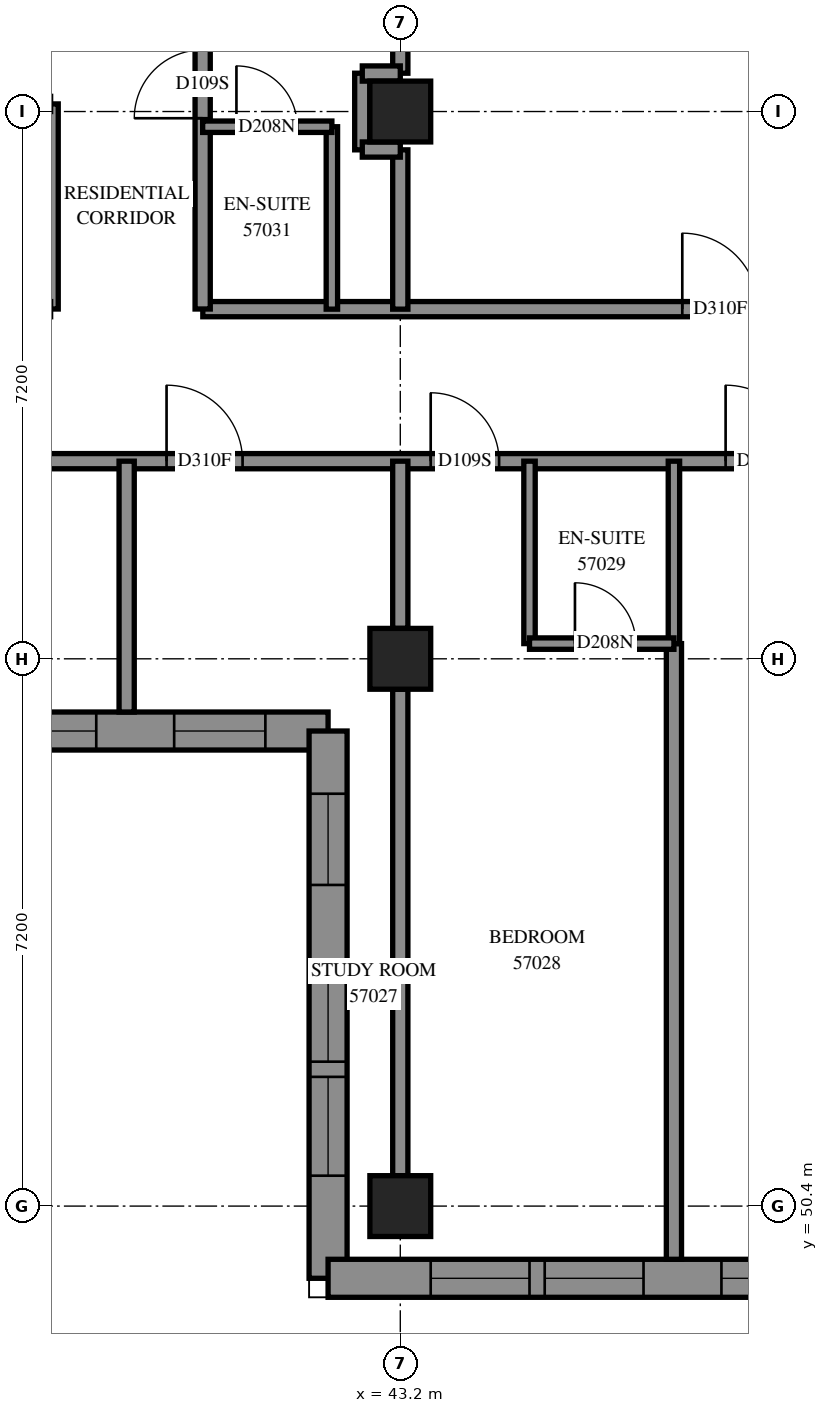
"""IFC4 building model, lengths in metres.
Left out: names, types, materials, properties, quantities, classifications, styles, units other than length and angle.
Written with IfcOpenShell. Run it as: python <this file> out.ifc"""

import sys

from ifc_helpers import new_model, si_unit, direction, frame, frame_2d, origin, origin_2d, place, context, subcontext, project, spatial, polyline, rectangle, outline, extrude, element, fill, save


model = new_model("IFC4")
c1 = context("Model", 3, precision=1e-05, world=origin(), true_north=direction((0.0, 1.0)))
c2 = subcontext(c1, "Body", "Model", "MODEL_VIEW")
j1 = project(units=[si_unit("LENGTHUNIT", "METRE"), si_unit("PLANEANGLEUNIT", "RADIAN")], contexts=[c1])
p1 = place(None, origin())
s1 = spatial("IfcSite", under=j1, at=p1, CompositionType="ELEMENT")
p2 = place(p1, origin())
s2 = spatial("IfcBuilding", under=s1, at=p2, CompositionType="ELEMENT")
p3 = place(p2, frame((0.0, 0.0, 210.0)))
s3 = spatial("IfcBuildingStorey", under=s2, at=p3, CompositionType="ELEMENT", Elevation=210.0)
for number, where, z_axis, x_axis in (
    (1, (43.2, 50.4, 0.0), (0.0, 0.0, 1.0), (1.0, 0.0, 0.0)),
    (2, (43.2, 57.6, 0.0), (0.0, 0.0, 1.0), (1.0, 0.0, 0.0)),
    (3, (43.2, 64.8, 0.0), (0.0, 0.0, 1.0), (1.0, 0.0, 0.0)),
):
    element("IfcColumn", number, at=place(p3, frame(where, z_axis=z_axis, x_axis=x_axis)), inside=s3, PredefinedType="COLUMN", context=c2, shape_type="SweptSolid", body=[
        extrude(rectangle(XDim=0.8, YDim=0.8, at=origin_2d()), origin(), (0.0, 0.0, 1.0), 3.1),
    ])
p4 = place(p3, frame((35.05, 56.65, 0.0), z_axis=(0.0, 0.0, 1.0), x_axis=(1.0, 0.0, 0.0)))
e4 = element("IfcWall", 4, at=p4, inside=s3, PredefinedType="SOLIDWALL", context=c2, shape_type="SweptSolid", body=[
    extrude(outline(polyline([(-0.25, -0.25), (6.95, -0.25), (7.45, 0.25), (0.25, 0.25), (-0.25, -0.25)])), origin(), (0.0, 0.0, 1.0), 3.1),
])
p5 = place(p4, frame((1.35, 0.0, 0.45)))
e5 = element("IfcOpeningElement", 5, at=p5, cuts=e4, PredefinedType="OPENING", context=c2, shape_type="SweptSolid", body=[
    extrude(rectangle(XDim=1.3, YDim=2.5, at=frame_2d((0.65, 1.25))), frame((0.0, 0.26, 0.0), z_axis=(0.0, -1.0, 0.0), x_axis=(1.0, 0.0, 0.0)), (0.0, 0.0, 1.0), 0.52),
])
p6 = place(p4, frame((2.85, 0.0, 0.45)))
e6 = element("IfcOpeningElement", 6, at=p6, cuts=e4, PredefinedType="OPENING", context=c2, shape_type="SweptSolid", body=[
    extrude(rectangle(XDim=1.3, YDim=2.5, at=frame_2d((0.65, 1.25))), frame((0.0, 0.26, 0.0), z_axis=(0.0, -1.0, 0.0), x_axis=(1.0, 0.0, 0.0)), (0.0, 0.0, 1.0), 0.52),
])
p7 = place(p4, frame((5.175, 0.0, 0.45)))
e7 = element("IfcOpeningElement", 7, at=p7, cuts=e4, PredefinedType="OPENING", context=c2, shape_type="SweptSolid", body=[
    extrude(rectangle(XDim=1.2, YDim=2.5, at=frame_2d((0.6, 1.25))), frame((0.0, 0.26, 0.0), z_axis=(0.0, -1.0, 0.0), x_axis=(1.0, 0.0, 0.0)), (0.0, 0.0, 1.0), 0.52),
])
p8 = place(p3, frame((42.25, 56.65, 0.0), z_axis=(0.0, 0.0, 1.0), x_axis=(0.0, -1.0, 0.0)))
e8 = element("IfcWall", 8, at=p8, inside=s3, PredefinedType="SOLIDWALL", context=c2, shape_type="SweptSolid", body=[
    extrude(outline(polyline([(0.25, -0.25), (7.45, -0.25), (6.95, 0.25), (-0.25, 0.25), (0.25, -0.25)])), origin(), (0.0, 0.0, 1.0), 3.1),
])
p9 = place(p8, frame((3.05, 0.0, 0.45)))
e9 = element("IfcOpeningElement", 9, at=p9, cuts=e8, PredefinedType="OPENING", context=c2, shape_type="SweptSolid", body=[
    extrude(rectangle(XDim=1.3, YDim=2.5, at=frame_2d((0.65, 1.25))), frame((0.0, 0.26, 0.0), z_axis=(0.0, -1.0, 0.0), x_axis=(1.0, 0.0, 0.0)), (0.0, 0.0, 1.0), 0.52),
])
p10 = place(p8, frame((4.55, 0.0, 0.45)))
e10 = element("IfcOpeningElement", 10, at=p10, cuts=e8, PredefinedType="OPENING", context=c2, shape_type="SweptSolid", body=[
    extrude(rectangle(XDim=1.3, YDim=2.5, at=frame_2d((0.65, 1.25))), frame((0.0, 0.26, 0.0), z_axis=(0.0, -1.0, 0.0), x_axis=(1.0, 0.0, 0.0)), (0.0, 0.0, 1.0), 0.52),
])
p11 = place(p8, frame((0.825, 0.0, 0.45)))
e11 = element("IfcOpeningElement", 11, at=p11, cuts=e8, PredefinedType="OPENING", context=c2, shape_type="SweptSolid", body=[
    extrude(rectangle(XDim=1.2, YDim=2.5, at=frame_2d((0.6, 1.25))), frame((0.0, 0.26, 0.0), z_axis=(0.0, -1.0, 0.0), x_axis=(1.0, 0.0, 0.0)), (0.0, 0.0, 1.0), 0.52),
])
p12 = place(p3, frame((42.25, 49.45, 0.0), z_axis=(0.0, 0.0, 1.0), x_axis=(1.0, 0.0, 0.0)))
e12 = element("IfcWall", 12, at=p12, inside=s3, PredefinedType="SOLIDWALL", context=c2, shape_type="SweptSolid", body=[
    extrude(outline(polyline([(-0.25, -0.25), (6.95, -0.25), (7.45, 0.25), (0.25, 0.25), (-0.25, -0.25)])), origin(), (0.0, 0.0, 1.0), 3.1),
])
p13 = place(p12, frame((1.35, 0.0, 0.45)))
e13 = element("IfcOpeningElement", 13, at=p13, cuts=e12, PredefinedType="OPENING", context=c2, shape_type="SweptSolid", body=[
    extrude(rectangle(XDim=1.3, YDim=2.5, at=frame_2d((0.65, 1.25))), frame((0.0, 0.26, 0.0), z_axis=(0.0, -1.0, 0.0), x_axis=(1.0, 0.0, 0.0)), (0.0, 0.0, 1.0), 0.52),
])
p14 = place(p12, frame((2.85, 0.0, 0.45)))
e14 = element("IfcOpeningElement", 14, at=p14, cuts=e12, PredefinedType="OPENING", context=c2, shape_type="SweptSolid", body=[
    extrude(rectangle(XDim=1.3, YDim=2.5, at=frame_2d((0.65, 1.25))), frame((0.0, 0.26, 0.0), z_axis=(0.0, -1.0, 0.0), x_axis=(1.0, 0.0, 0.0)), (0.0, 0.0, 1.0), 0.52),
])
p15 = place(p12, frame((5.175, 0.0, 0.45)))
e15 = element("IfcOpeningElement", 15, at=p15, cuts=e12, PredefinedType="OPENING", context=c2, shape_type="SweptSolid", body=[
    extrude(rectangle(XDim=1.2, YDim=2.5, at=frame_2d((0.6, 1.25))), frame((0.0, 0.26, 0.0), z_axis=(0.0, -1.0, 0.0), x_axis=(1.0, 0.0, 0.0)), (0.0, 0.0, 1.0), 0.52),
])
p16 = place(p3, frame((36.0, 60.2, 0.0), z_axis=(0.0, 0.0, 1.0), x_axis=(1.0, 0.0, 0.0)))
e16 = element("IfcWall", 16, at=p16, inside=s3, PredefinedType="PARTITIONING", context=c2, shape_type="SweptSolid", body=[
    extrude(rectangle(XDim=17.0, YDim=0.2, at=frame_2d((8.5, 0.0))), origin(), (0.0, 0.0, 1.0), 3.1),
])
p17 = place(p16, frame((4.125, 0.0, 0.0)))
e17 = element("IfcOpeningElement", 17, at=p17, cuts=e16, PredefinedType="OPENING", context=c2, shape_type="SweptSolid", body=[
    extrude(rectangle(XDim=1.0, YDim=2.1, at=frame_2d((0.5, 1.05))), frame((0.0, 0.11, 0.0), z_axis=(0.0, -1.0, 0.0), x_axis=(1.0, 0.0, 0.0)), (0.0, 0.0, 1.0), 0.22),
])
p18 = place(p16, frame((7.6, 0.0, 0.0)))
e18 = element("IfcOpeningElement", 18, at=p18, cuts=e16, PredefinedType="OPENING", context=c2, shape_type="SweptSolid", body=[
    extrude(rectangle(XDim=0.9, YDim=2.1, at=frame_2d((0.45, 1.05))), frame((0.0, 0.11, 0.0), z_axis=(0.0, -1.0, 0.0), x_axis=(1.0, 0.0, 0.0)), (0.0, 0.0, 1.0), 0.22),
])
p19 = place(p16, frame((11.48, 0.0, 0.0)))
e19 = element("IfcOpeningElement", 19, at=p19, cuts=e16, PredefinedType="OPENING", context=c2, shape_type="SweptSolid", body=[
    extrude(rectangle(XDim=1.0, YDim=2.1, at=frame_2d((0.5, 1.05))), frame((0.0, 0.11, 0.0), z_axis=(0.0, -1.0, 0.0), x_axis=(1.0, 0.0, 0.0)), (0.0, 0.0, 1.0), 0.22),
])
p20 = place(p16, frame((15.805, 0.0, 0.0)))
e20 = element("IfcOpeningElement", 20, at=p20, cuts=e16, PredefinedType="OPENING", context=c2, shape_type="SweptSolid", body=[
    extrude(rectangle(XDim=1.0, YDim=2.1, at=frame_2d((0.5, 1.05))), frame((0.0, 0.11, 0.0), z_axis=(0.0, -1.0, 0.0), x_axis=(1.0, 0.0, 0.0)), (0.0, 0.0, 1.0), 0.22),
])
p21 = place(p3, frame((40.602, 62.2, 0.0), z_axis=(0.0, 0.0, 1.0), x_axis=(1.0, 0.0, 0.0)))
e21 = element("IfcWall", 21, at=p21, inside=s3, PredefinedType="PARTITIONING", context=c2, shape_type="SweptSolid", body=[
    extrude(rectangle(XDim=14.998, YDim=0.2, at=frame_2d((7.499, 0.0))), origin(), (0.0, 0.0, 1.0), 3.1),
])
p22 = place(p21, frame((6.308, 0.0, 0.0)))
e22 = element("IfcOpeningElement", 22, at=p22, cuts=e21, PredefinedType="OPENING", context=c2, shape_type="SweptSolid", body=[
    extrude(rectangle(XDim=1.0, YDim=2.1, at=frame_2d((0.5, 1.05))), frame((0.0, 0.11, 0.0), z_axis=(0.0, -1.0, 0.0), x_axis=(1.0, 0.0, 0.0)), (0.0, 0.0, 1.0), 0.22),
])
p23 = place(p21, frame((9.928, 0.0, 0.0)))
e23 = element("IfcOpeningElement", 23, at=p23, cuts=e21, PredefinedType="OPENING", context=c2, shape_type="SweptSolid", body=[
    extrude(rectangle(XDim=0.9, YDim=2.1, at=frame_2d((0.45, 1.05))), frame((0.0, 0.11, 0.0), z_axis=(0.0, -1.0, 0.0), x_axis=(1.0, 0.0, 0.0)), (0.0, 0.0, 1.0), 0.22),
])
p24 = place(p21, frame((13.746, 0.0, 0.0)))
e24 = element("IfcOpeningElement", 24, at=p24, cuts=e21, PredefinedType="OPENING", context=c2, shape_type="SweptSolid", body=[
    extrude(rectangle(XDim=1.0, YDim=2.1, at=frame_2d((0.5, 1.05))), frame((0.0, 0.11, 0.0), z_axis=(0.0, -1.0, 0.0), x_axis=(1.0, 0.0, 0.0)), (0.0, 0.0, 1.0), 0.22),
])
p25 = place(p3, frame((46.8, 49.7, 0.0), z_axis=(0.0, 0.0, 1.0), x_axis=(0.0, 1.0, 0.0)))
e25 = element("IfcWall", 25, at=p25, inside=s3, PredefinedType="PARTITIONING", context=c2, shape_type="SweptSolid", body=[
    extrude(rectangle(XDim=8.1, YDim=0.2, at=frame_2d((4.05, 0.0))), origin(), (0.0, 0.0, 1.0), 3.1),
])
p26 = place(p3, frame((43.2, 50.8, 0.0), z_axis=(0.0, 0.0, 1.0), x_axis=(0.0, 1.0, 0.0)))
e26 = element("IfcWall", 26, at=p26, inside=s3, PredefinedType="PARTITIONING", context=c2, shape_type="SweptSolid", body=[
    extrude(rectangle(XDim=6.4, YDim=0.2, at=frame_2d((3.2, 0.0))), origin(), (0.0, 0.0, 1.0), 2.6),
])
p27 = place(p3, frame((43.2, 65.304, 0.0), z_axis=(0.0, 0.0, 1.0), x_axis=(0.0, 1.0, 0.0)))
e27 = element("IfcWall", 27, at=p27, inside=s3, PredefinedType="PARTITIONING", context=c2, shape_type="SweptSolid", body=[
    extrude(rectangle(XDim=6.192, YDim=0.2, at=frame_2d((3.096, 0.0))), origin(), (0.0, 0.0, 1.0), 3.1),
])
p28 = place(p3, frame((40.6, 62.202, 0.0), z_axis=(0.0, 0.0, 1.0), x_axis=(0.0, 1.0, 0.0)))
e28 = element("IfcWall", 28, at=p28, inside=s3, PredefinedType="PARTITIONING", context=c2, shape_type="SweptSolid", body=[
    extrude(rectangle(XDim=4.698, YDim=0.2, at=frame_2d((2.349, 0.0))), origin(), (0.0, 0.0, 1.0), 3.1),
])
p29 = place(p28, frame((2.51, 0.0, 0.0)))
e29 = element("IfcOpeningElement", 29, at=p29, cuts=e28, PredefinedType="OPENING", context=c2, shape_type="SweptSolid", body=[
    extrude(rectangle(XDim=0.9, YDim=2.1, at=frame_2d((0.45, 1.05))), frame((0.0, 0.11, 0.0), z_axis=(0.0, -1.0, 0.0), x_axis=(1.0, 0.0, 0.0)), (0.0, 0.0, 1.0), 0.22),
])
p30 = place(p3, frame((39.6, 56.9, 0.0), z_axis=(0.0, 0.0, 1.0), x_axis=(0.0, 1.0, 0.0)))
e30 = element("IfcWall", 30, at=p30, inside=s3, PredefinedType="PARTITIONING", context=c2, shape_type="SweptSolid", body=[
    extrude(rectangle(XDim=3.3, YDim=0.2, at=frame_2d((1.65, 0.0))), origin(), (0.0, 0.0, 1.0), 3.1),
])
p31 = place(p3, frame((38.6, 62.202, 0.0), z_axis=(0.0, 0.0, 1.0), x_axis=(0.0, 1.0, 0.0)))
e31 = element("IfcWall", 31, at=p31, inside=s3, PredefinedType="PARTITIONING", context=c2, shape_type="SweptSolid", body=[
    extrude(rectangle(XDim=2.698, YDim=0.2, at=frame_2d((1.349, 0.0))), origin(), (0.0, 0.0, 1.0), 3.1),
])
for number, where, z_axis, x_axis in (
    (32, (44.9, 57.8, 0.0), (0.0, 0.0, 1.0), (0.0, 1.0, 0.0)),
    (33, (46.8, 57.8, 0.0), (0.0, 0.0, 1.0), (0.0, 1.0, 0.0)),
    (34, (42.3, 62.2, 0.0), (0.0, 0.0, 1.0), (0.0, 1.0, 0.0)),
):
    element("IfcWall", number, at=place(p3, frame(where, z_axis=z_axis, x_axis=x_axis)), inside=s3, PredefinedType="PARTITIONING", context=c2, shape_type="SweptSolid", body=[
        extrude(rectangle(XDim=2.4, YDim=0.15, at=frame_2d((1.2, 0.0))), origin(), (0.0, 0.0, 1.0), 3.1),
    ])
p32 = place(p3, frame((43.2, 58.0, 0.0), z_axis=(0.0, 0.0, 1.0), x_axis=(0.0, 1.0, 0.0)))
e35 = element("IfcWall", 35, at=p32, inside=s3, PredefinedType="PARTITIONING", context=c2, shape_type="SweptSolid", body=[
    extrude(rectangle(XDim=2.2, YDim=0.2, at=frame_2d((1.1, 0.0))), origin(), (0.0, 0.0, 1.0), 3.1),
])
p33 = place(p3, frame((43.2, 62.2, 0.0), z_axis=(0.0, 0.0, 1.0), x_axis=(0.0, 1.0, 0.0)))
e36 = element("IfcWall", 36, at=p33, inside=s3, PredefinedType="PARTITIONING", context=c2, shape_type="SweptSolid", body=[
    extrude(rectangle(XDim=2.096, YDim=0.2, at=frame_2d((1.048, 0.0))), origin(), (0.0, 0.0, 1.0), 3.1),
])
p34 = place(p3, frame((44.9, 57.8, 0.0), z_axis=(0.0, 0.0, 1.0), x_axis=(1.0, 0.0, 0.0)))
e37 = element("IfcWall", 37, at=p34, inside=s3, PredefinedType="PARTITIONING", context=c2, shape_type="SweptSolid", body=[
    extrude(rectangle(XDim=1.9, YDim=0.15, at=frame_2d((0.95, 0.0))), origin(), (0.0, 0.0, 1.0), 3.1),
])
p35 = place(p34, frame((0.598, 0.0, 0.0)))
e38 = element("IfcOpeningElement", 38, at=p35, cuts=e37, PredefinedType="OPENING", context=c2, shape_type="SweptSolid", body=[
    extrude(rectangle(XDim=0.8, YDim=2.1, at=frame_2d((0.4, 1.05))), frame((0.0, 0.085, 0.0), z_axis=(0.0, -1.0, 0.0), x_axis=(1.0, 0.0, 0.0)), (0.0, 0.0, 1.0), 0.17),
])
p36 = place(p3, frame((40.6, 64.6, 0.0), z_axis=(0.0, 0.0, 1.0), x_axis=(1.0, 0.0, 0.0)))
e39 = element("IfcWall", 39, at=p36, inside=s3, PredefinedType="PARTITIONING", context=c2, shape_type="SweptSolid", body=[
    extrude(rectangle(XDim=1.7, YDim=0.15, at=frame_2d((0.85, 0.0))), origin(), (0.0, 0.0, 1.0), 3.1),
])
p37 = place(p36, frame((0.444, 0.0, 0.0)))
e40 = element("IfcOpeningElement", 40, at=p37, cuts=e39, PredefinedType="OPENING", context=c2, shape_type="SweptSolid", body=[
    extrude(rectangle(XDim=0.8, YDim=2.1, at=frame_2d((0.4, 1.05))), frame((0.0, 0.085, 0.0), z_axis=(0.0, -1.0, 0.0), x_axis=(1.0, 0.0, 0.0)), (0.0, 0.0, 1.0), 0.17),
])
p38 = place(p3, frame((42.7, 64.296, 0.0), z_axis=(0.0, 0.0, 1.0), x_axis=(0.0, 1.0, 0.0)))
e41 = element("IfcWall", 41, at=p38, inside=s3, PredefinedType="PARTITIONING", context=c2, shape_type="SweptSolid", body=[
    extrude(rectangle(XDim=1.008, YDim=0.2, at=frame_2d((0.504, 0.0))), origin(), (0.0, 0.0, 1.0), 3.1),
])
for number, where, z_axis, x_axis in (
    (42, (42.7, 65.3, 0.0), (0.0, 0.0, 1.0), (1.0, 0.0, 0.0)),
    (43, (42.7, 64.3, 0.0), (0.0, 0.0, 1.0), (1.0, 0.0, 0.0)),
):
    element("IfcWall", number, at=place(p3, frame(where, z_axis=z_axis, x_axis=x_axis)), inside=s3, PredefinedType="PARTITIONING", context=c2, shape_type="SweptSolid", body=[
        extrude(rectangle(XDim=0.5, YDim=0.2, at=frame_2d((0.25, 0.0))), origin(), (0.0, 0.0, 1.0), 3.1),
    ])
p39 = place(p6, origin())
e44 = element("IfcWindow", 44, at=p39, inside=s3, PartitioningType="SINGLE_PANEL", PredefinedType="WINDOW", context=c2, shape_type="SweptSolid", body=[
    extrude(rectangle(XDim=1.3, YDim=2.5, at=frame_2d((0.65, 1.25))), frame((0.0, 0.18, 0.0), z_axis=(0.0, -1.0, 0.0), x_axis=(1.0, 0.0, 0.0)), (0.0, 0.0, 1.0), 0.06),
])
fill(e6, e44)
p40 = place(p7, origin())
e45 = element("IfcWindow", 45, at=p40, inside=s3, PartitioningType="SINGLE_PANEL", PredefinedType="WINDOW", context=c2, shape_type="SweptSolid", body=[
    extrude(rectangle(XDim=1.2, YDim=2.5, at=frame_2d((0.6, 1.25))), frame((0.0, 0.18, 0.0), z_axis=(0.0, -1.0, 0.0), x_axis=(1.0, 0.0, 0.0)), (0.0, 0.0, 1.0), 0.06),
])
fill(e7, e45)
p41 = place(p9, origin())
e46 = element("IfcWindow", 46, at=p41, inside=s3, PartitioningType="SINGLE_PANEL", PredefinedType="WINDOW", context=c2, shape_type="SweptSolid", body=[
    extrude(rectangle(XDim=1.3, YDim=2.5, at=frame_2d((0.65, 1.25))), frame((0.0, 0.18, 0.0), z_axis=(0.0, -1.0, 0.0), x_axis=(1.0, 0.0, 0.0)), (0.0, 0.0, 1.0), 0.06),
])
fill(e9, e46)
p42 = place(p10, origin())
e47 = element("IfcWindow", 47, at=p42, inside=s3, PartitioningType="SINGLE_PANEL", PredefinedType="WINDOW", context=c2, shape_type="SweptSolid", body=[
    extrude(rectangle(XDim=1.3, YDim=2.5, at=frame_2d((0.65, 1.25))), frame((0.0, 0.18, 0.0), z_axis=(0.0, -1.0, 0.0), x_axis=(1.0, 0.0, 0.0)), (0.0, 0.0, 1.0), 0.06),
])
fill(e10, e47)
p43 = place(p11, origin())
e48 = element("IfcWindow", 48, at=p43, inside=s3, PartitioningType="SINGLE_PANEL", PredefinedType="WINDOW", context=c2, shape_type="SweptSolid", body=[
    extrude(rectangle(XDim=1.2, YDim=2.5, at=frame_2d((0.6, 1.25))), frame((0.0, 0.18, 0.0), z_axis=(0.0, -1.0, 0.0), x_axis=(1.0, 0.0, 0.0)), (0.0, 0.0, 1.0), 0.06),
])
fill(e11, e48)
p44 = place(p13, origin())
e49 = element("IfcWindow", 49, at=p44, inside=s3, PartitioningType="SINGLE_PANEL", PredefinedType="WINDOW", context=c2, shape_type="SweptSolid", body=[
    extrude(rectangle(XDim=1.3, YDim=2.5, at=frame_2d((0.65, 1.25))), frame((0.0, 0.18, 0.0), z_axis=(0.0, -1.0, 0.0), x_axis=(1.0, 0.0, 0.0)), (0.0, 0.0, 1.0), 0.06),
])
fill(e13, e49)
p45 = place(p14, origin())
e50 = element("IfcWindow", 50, at=p45, inside=s3, PartitioningType="SINGLE_PANEL", PredefinedType="WINDOW", context=c2, shape_type="SweptSolid", body=[
    extrude(rectangle(XDim=1.3, YDim=2.5, at=frame_2d((0.65, 1.25))), frame((0.0, 0.18, 0.0), z_axis=(0.0, -1.0, 0.0), x_axis=(1.0, 0.0, 0.0)), (0.0, 0.0, 1.0), 0.06),
])
fill(e14, e50)
p46 = place(p15, origin())
e51 = element("IfcWindow", 51, at=p46, inside=s3, PartitioningType="SINGLE_PANEL", PredefinedType="WINDOW", context=c2, shape_type="SweptSolid", body=[
    extrude(rectangle(XDim=1.2, YDim=2.5, at=frame_2d((0.6, 1.25))), frame((0.0, 0.18, 0.0), z_axis=(0.0, -1.0, 0.0), x_axis=(1.0, 0.0, 0.0)), (0.0, 0.0, 1.0), 0.06),
])
fill(e15, e51)
p47 = place(p17, origin())
e52 = element("IfcDoor", 52, at=p47, inside=s3, OperationType="SINGLE_SWING_RIGHT", PredefinedType="DOOR", context=c2, shape_type="SweptSolid", body=[
    extrude(rectangle(XDim=1.0, YDim=2.1, at=frame_2d((0.5, 1.05))), frame((0.0, 0.025, 0.0), z_axis=(0.0, -1.0, 0.0), x_axis=(1.0, 0.0, 0.0)), (0.0, 0.0, 1.0), 0.05),
])
fill(e17, e52)
p48 = place(p18, origin())
e53 = element("IfcDoor", 53, at=p48, inside=s3, OperationType="SINGLE_SWING_LEFT", PredefinedType="DOOR", context=c2, shape_type="SweptSolid", body=[
    extrude(rectangle(XDim=0.9, YDim=2.1, at=frame_2d((0.45, 1.05))), frame((0.0, 0.025, 0.0), z_axis=(0.0, -1.0, 0.0), x_axis=(1.0, 0.0, 0.0)), (0.0, 0.0, 1.0), 0.05),
])
fill(e18, e53)
p49 = place(p35, origin())
e54 = element("IfcDoor", 54, at=p49, inside=s3, OperationType="SINGLE_SWING_RIGHT", PredefinedType="DOOR", context=c2, shape_type="SweptSolid", body=[
    extrude(rectangle(XDim=0.8, YDim=2.1, at=frame_2d((0.4, 1.05))), frame((0.0, 0.025, 0.0), z_axis=(0.0, -1.0, 0.0), x_axis=(1.0, 0.0, 0.0)), (0.0, 0.0, 1.0), 0.05),
])
fill(e38, e54)
p50 = place(p29, origin())
e55 = element("IfcDoor", 55, at=p50, inside=s3, OperationType="SINGLE_SWING_LEFT", PredefinedType="DOOR", context=c2, shape_type="SweptSolid", body=[
    extrude(rectangle(XDim=0.9, YDim=2.1, at=frame_2d((0.45, 1.05))), frame((0.0, 0.025, 0.0), z_axis=(0.0, -1.0, 0.0), x_axis=(1.0, 0.0, 0.0)), (0.0, 0.0, 1.0), 0.05),
])
fill(e29, e55)
p51 = place(p37, origin())
e56 = element("IfcDoor", 56, at=p51, inside=s3, OperationType="SINGLE_SWING_RIGHT", PredefinedType="DOOR", context=c2, shape_type="SweptSolid", body=[
    extrude(rectangle(XDim=0.8, YDim=2.1, at=frame_2d((0.4, 1.05))), frame((0.0, 0.025, 0.0), z_axis=(0.0, -1.0, 0.0), x_axis=(1.0, 0.0, 0.0)), (0.0, 0.0, 1.0), 0.05),
])
fill(e40, e56)
p52 = place(p22, origin())
e57 = element("IfcDoor", 57, at=p52, inside=s3, OperationType="SINGLE_SWING_RIGHT", PredefinedType="DOOR", context=c2, shape_type="SweptSolid", body=[
    extrude(rectangle(XDim=1.0, YDim=2.1, at=frame_2d((0.5, 1.05))), frame((0.0, 0.025, 0.0), z_axis=(0.0, -1.0, 0.0), x_axis=(1.0, 0.0, 0.0)), (0.0, 0.0, 1.0), 0.05),
])
fill(e22, e57)
p53 = place(p19, origin())
e58 = element("IfcDoor", 58, at=p53, inside=s3, OperationType="SINGLE_SWING_RIGHT", PredefinedType="DOOR", context=c2, shape_type="SweptSolid", body=[
    extrude(rectangle(XDim=1.0, YDim=2.1, at=frame_2d((0.5, 1.05))), frame((0.0, 0.025, 0.0), z_axis=(0.0, -1.0, 0.0), x_axis=(1.0, 0.0, 0.0)), (0.0, 0.0, 1.0), 0.05),
])
fill(e19, e58)
save(model, sys.argv[1])
